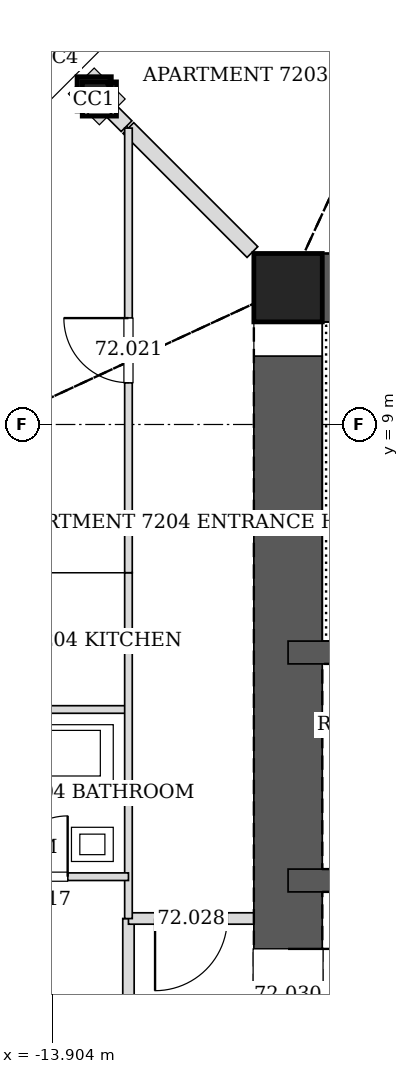
"""IFC4 building model, lengths in metres.
Left out: names, types, materials, properties, quantities, classifications, styles, units other than length and angle.
Written with IfcOpenShell. Run it as: python <this file> out.ifc"""

import sys

from ifc_helpers import new_model, si_unit, direction, frame, frame_2d, origin, origin_2d, place, context, subcontext, project, spatial, rectangle, hollow_rectangle, extrude, element, fill, save


model = new_model("IFC4")
c1 = context("Model", 3, precision=1e-05, world=origin(), true_north=direction((0.0, 1.0)))
c2 = subcontext(c1, "Body", "Model", "MODEL_VIEW")
j1 = project(units=[si_unit("LENGTHUNIT", "METRE"), si_unit("PLANEANGLEUNIT", "RADIAN")], contexts=[c1])
p1 = place(None, origin())
s1 = spatial("IfcSite", under=j1, at=p1, CompositionType="ELEMENT")
p2 = place(p1, origin())
s2 = spatial("IfcBuilding", under=s1, at=p2, CompositionType="ELEMENT")
p3 = place(p2, frame((0.0, 0.0, 294.6)))
s3 = spatial("IfcBuildingStorey", under=s2, at=p3, CompositionType="ELEMENT", Elevation=294.6)
p4 = place(p3, frame((-13.351, 13.351, 0.0), z_axis=(0.020026431307, -0.020026431307, 0.999598861593), x_axis=(0.707106781187, 0.707106781187, 0.0)))
e1 = element("IfcColumn", 1, at=p4, inside=s3, PredefinedType="COLUMN", context=c2, shape_type="SweptSolid", body=[
    extrude(hollow_rectangle(XDim=0.45, YDim=0.45, WallThickness=0.02, at=origin_2d()), origin(), (0.0, 0.0, 1.0), 3.401),
])
p5 = place(p3, frame((-10.8, 10.8, 0.0), z_axis=(0.0, 0.0, 1.0), x_axis=(1.0, 0.0, 0.0)))
e2 = element("IfcColumn", 2, at=p5, inside=s3, PredefinedType="COLUMN", context=c2, shape_type="SweptSolid", body=[
    extrude(hollow_rectangle(XDim=0.9, YDim=0.9, WallThickness=0.04, at=origin_2d()), origin(), (0.0, 0.0, 1.0), 3.4),
])
p6 = place(p3, frame((10.8, 10.8, 0.0), z_axis=(0.0, 0.0, 1.0), x_axis=(-1.0, 0.0, 0.0)))
e3 = element("IfcWall", 3, at=p6, inside=s3, PredefinedType="SOLIDWALL", context=c2, shape_type="SweptSolid", body=[
    extrude(rectangle(XDim=21.6, YDim=0.9, at=frame_2d((10.8, 0.0))), origin(), (0.0, 0.0, 1.0), 3.4),
])
p7 = place(p6, frame((10.05, 0.0, 0.0)))
e4 = element("IfcOpeningElement", 4, at=p7, cuts=e3, PredefinedType="OPENING", context=c2, shape_type="SweptSolid", body=[
    extrude(rectangle(XDim=1.5, YDim=2.1, at=frame_2d((0.75, 1.05))), frame((0.0, 0.46, 0.0), z_axis=(0.0, -1.0, 0.0), x_axis=(1.0, 0.0, 0.0)), (0.0, 0.0, 1.0), 0.92),
])
p8 = place(p3, frame((-10.8, 10.8, 0.0), z_axis=(0.0, 0.0, 1.0), x_axis=(0.0, -1.0, 0.0)))
e5 = element("IfcWall", 5, at=p8, inside=s3, PredefinedType="SOLIDWALL", context=c2, shape_type="SweptSolid", body=[
    extrude(rectangle(XDim=21.6, YDim=0.9, at=frame_2d((10.8, 0.0))), origin(), (0.0, 0.0, 1.0), 3.4),
])
p9 = place(p8, frame((8.7, 0.0, 0.0)))
e6 = element("IfcOpeningElement", 6, at=p9, cuts=e5, PredefinedType="OPENING", context=c2, shape_type="SweptSolid", body=[
    extrude(rectangle(XDim=1.2, YDim=2.1, at=frame_2d((0.6, 1.05))), frame((0.0, 0.46, 0.0), z_axis=(0.0, -1.0, 0.0), x_axis=(1.0, 0.0, 0.0)), (0.0, 0.0, 1.0), 0.92),
])
p10 = place(p8, frame((11.7, 0.0, 0.0)))
e7 = element("IfcOpeningElement", 7, at=p10, cuts=e5, PredefinedType="OPENING", context=c2, shape_type="SweptSolid", body=[
    extrude(rectangle(XDim=1.2, YDim=2.1, at=frame_2d((0.6, 1.05))), frame((0.0, 0.46, 0.0), z_axis=(0.0, -1.0, 0.0), x_axis=(1.0, 0.0, 0.0)), (0.0, 0.0, 1.0), 0.92),
])
p11 = place(p3, frame((-10.8, 3.0, 0.0), z_axis=(0.0, 0.0, 1.0), x_axis=(1.0, 0.0, 0.0)))
e8 = element("IfcWall", 8, at=p11, inside=s3, PredefinedType="SOLIDWALL", context=c2, shape_type="SweptSolid", body=[
    extrude(rectangle(XDim=21.6, YDim=0.3, at=frame_2d((10.8, 0.0))), origin(), (0.0, 0.0, 1.0), 3.4),
])
p12 = place(p11, frame((1.65, 0.0, 0.0)))
e9 = element("IfcOpeningElement", 9, at=p12, cuts=e8, PredefinedType="OPENING", context=c2, shape_type="SweptSolid", body=[
    extrude(rectangle(XDim=0.9, YDim=2.1, at=frame_2d((0.45, 1.05))), frame((0.0, 0.16, 0.0), z_axis=(0.0, -1.0, 0.0), x_axis=(1.0, 0.0, 0.0)), (0.0, 0.0, 1.0), 0.32),
])
p13 = place(p11, frame((4.55, 0.0, 0.0)))
e10 = element("IfcOpeningElement", 10, at=p13, cuts=e8, PredefinedType="OPENING", context=c2, shape_type="SweptSolid", body=[
    extrude(rectangle(XDim=0.9, YDim=2.1, at=frame_2d((0.45, 1.05))), frame((0.0, 0.16, 0.0), z_axis=(0.0, -1.0, 0.0), x_axis=(1.0, 0.0, 0.0)), (0.0, 0.0, 1.0), 0.32),
])
p14 = place(p11, frame((13.25, 0.0, 0.0)))
e11 = element("IfcOpeningElement", 11, at=p14, cuts=e8, PredefinedType="OPENING", context=c2, shape_type="SweptSolid", body=[
    extrude(rectangle(XDim=0.9, YDim=2.1, at=frame_2d((0.45, 1.05))), frame((0.0, 0.16, 0.0), z_axis=(0.0, -1.0, 0.0), x_axis=(1.0, 0.0, 0.0)), (0.0, 0.0, 1.0), 0.32),
])
p15 = place(p11, frame((7.45, 0.0, 0.0)))
e12 = element("IfcOpeningElement", 12, at=p15, cuts=e8, PredefinedType="OPENING", context=c2, shape_type="SweptSolid", body=[
    extrude(rectangle(XDim=0.9, YDim=2.1, at=frame_2d((0.45, 1.05))), frame((0.0, 0.16, 0.0), z_axis=(0.0, -1.0, 0.0), x_axis=(1.0, 0.0, 0.0)), (0.0, 0.0, 1.0), 0.32),
])
p16 = place(p11, frame((16.15, 0.0, 0.0)))
e13 = element("IfcOpeningElement", 13, at=p16, cuts=e8, PredefinedType="OPENING", context=c2, shape_type="SweptSolid", body=[
    extrude(rectangle(XDim=0.9, YDim=2.1, at=frame_2d((0.45, 1.05))), frame((0.0, 0.16, 0.0), z_axis=(0.0, -1.0, 0.0), x_axis=(1.0, 0.0, 0.0)), (0.0, 0.0, 1.0), 0.32),
])
p17 = place(p11, frame((19.05, 0.0, 0.0)))
e14 = element("IfcOpeningElement", 14, at=p17, cuts=e8, PredefinedType="OPENING", context=c2, shape_type="SweptSolid", body=[
    extrude(rectangle(XDim=0.9, YDim=2.1, at=frame_2d((0.45, 1.05))), frame((0.0, 0.16, 0.0), z_axis=(0.0, -1.0, 0.0), x_axis=(1.0, 0.0, 0.0)), (0.0, 0.0, 1.0), 0.32),
])
p18 = place(p3, frame((-10.8, 6.0, 0.0), z_axis=(0.0, 0.0, 1.0), x_axis=(1.0, 0.0, 0.0)))
e15 = element("IfcWall", 15, at=p18, inside=s3, PredefinedType="SOLIDWALL", context=c2, shape_type="SweptSolid", body=[
    extrude(rectangle(XDim=21.6, YDim=0.3, at=frame_2d((10.8, 0.0))), origin(), (0.0, 0.0, 1.0), 3.4),
])
p19 = place(p18, frame((10.25, 0.0, 0.0)))
e16 = element("IfcOpeningElement", 16, at=p19, cuts=e15, PredefinedType="OPENING", context=c2, shape_type="SweptSolid", body=[
    extrude(rectangle(XDim=1.1, YDim=2.1, at=frame_2d((0.55, 1.05))), frame((0.0, 0.16, 0.0), z_axis=(0.0, -1.0, 0.0), x_axis=(1.0, 0.0, 0.0)), (0.0, 0.0, 1.0), 0.32),
])
p20 = place(p3, frame((-12.9, 2.5, 0.0), z_axis=(0.0, 0.0, 1.0), x_axis=(0.0, -1.0, 0.0)))
e17 = element("IfcWall", 17, at=p20, inside=s3, PredefinedType="PARTITIONING", context=c2, shape_type="SweptSolid", body=[
    extrude(rectangle(XDim=9.251, YDim=0.15, at=frame_2d((4.625, 0.0))), origin(), (0.0, 0.0, 1.0), 2.349),
])
p21 = place(p3, frame((-11.25, 2.5, 0.0), z_axis=(0.0, 0.0, 1.0), x_axis=(-1.0, 0.0, 0.0)))
e18 = element("IfcWall", 18, at=p21, inside=s3, PredefinedType="PARTITIONING", context=c2, shape_type="SweptSolid", body=[
    extrude(rectangle(XDim=1.65, YDim=0.15, at=frame_2d((0.825, 0.0))), origin(), (0.0, 0.0, 1.0), 3.2),
])
p22 = place(p21, frame((0.35, 0.0, 0.0)))
e19 = element("IfcOpeningElement", 19, at=p22, cuts=e18, PredefinedType="OPENING", context=c2, shape_type="SweptSolid", body=[
    extrude(rectangle(XDim=0.95, YDim=2.1, at=frame_2d((0.475, 1.05))), frame((0.0, 0.085, 0.0), z_axis=(0.0, -1.0, 0.0), x_axis=(1.0, 0.0, 0.0)), (0.0, 0.0, 1.0), 0.17),
])
p23 = place(p3, frame((-13.11, 13.11, 0.0), z_axis=(0.0, 0.0, 1.0), x_axis=(0.707106781187, -0.707106781187, 0.0)))
e20 = element("IfcWall", 20, at=p23, inside=s3, PredefinedType="PARTITIONING", context=c2, shape_type="SweptSolid", body=[
    extrude(rectangle(XDim=0.262, YDim=0.2, at=frame_2d((0.131, 0.0))), origin(), (0.0, 0.0, 1.0), 2.591),
])
p24 = place(p3, frame((-12.901, 12.901, 0.0), z_axis=(0.0, 0.0, 1.0), x_axis=(0.707106781187, -0.707106781187, 0.0)))
e21 = element("IfcWall", 21, at=p24, inside=s3, PredefinedType="PARTITIONING", context=c2, shape_type="SweptSolid", body=[
    extrude(rectangle(XDim=2.308, YDim=0.2, at=frame_2d((1.154, 0.0))), origin(), (0.0, 0.0, 1.0), 2.591),
])
p25 = place(p3, frame((-15.3, 5.25, 0.0), z_axis=(0.0, 0.0, 1.0), x_axis=(1.0, 0.0, 0.0)))
e22 = element("IfcWall", 22, at=p25, inside=s3, PredefinedType="PARTITIONING", context=c2, shape_type="SweptSolid", body=[
    extrude(rectangle(XDim=2.4, YDim=0.1, at=frame_2d((1.2, 0.0))), origin(), (0.0, 0.0, 1.0), 2.73),
])
p26 = place(p3, frame((-12.9, 7.05, 0.0), z_axis=(0.0, 0.0, 1.0), x_axis=(0.0, -1.0, 0.0)))
e23 = element("IfcWall", 23, at=p26, inside=s3, PredefinedType="PARTITIONING", context=c2, shape_type="SweptSolid", body=[
    extrude(rectangle(XDim=4.551, YDim=0.1, at=frame_2d((2.275, 0.0))), origin(), (0.0, 0.0, 1.0), 3.2),
])
p27 = place(p3, frame((-15.3, 3.05, 0.0), z_axis=(0.0, 0.0, 1.0), x_axis=(1.0, 0.0, 0.0)))
e24 = element("IfcWall", 24, at=p27, inside=s3, PredefinedType="PARTITIONING", context=c2, shape_type="SweptSolid", body=[
    extrude(rectangle(XDim=2.4, YDim=0.1, at=frame_2d((1.2, 0.0))), origin(), (0.0, 0.0, 1.0), 2.73),
])
p28 = place(p27, frame((0.8, 0.0, 0.0)))
e25 = element("IfcOpeningElement", 25, at=p28, cuts=e24, PredefinedType="OPENING", context=c2, shape_type="SweptSolid", body=[
    extrude(rectangle(XDim=0.8, YDim=2.1, at=frame_2d((0.4, 1.05))), frame((0.0, 0.06, 0.0), z_axis=(0.0, -1.0, 0.0), x_axis=(1.0, 0.0, 0.0)), (0.0, 0.0, 1.0), 0.12),
])
p29 = place(p3, frame((-12.9, 7.05, 0.0), z_axis=(0.0, 0.0, 1.0), x_axis=(0.0, 1.0, 0.0)))
e26 = element("IfcWall", 26, at=p29, inside=s3, PredefinedType="PARTITIONING", context=c2, shape_type="SweptSolid", body=[
    extrude(rectangle(XDim=5.85, YDim=0.1, at=frame_2d((2.925, 0.0))), origin(), (0.0, 0.0, 1.0), 2.497),
])
p30 = place(p29, frame((2.5, 0.0, 0.0)))
e27 = element("IfcOpeningElement", 27, at=p30, cuts=e26, PredefinedType="OPENING", context=c2, shape_type="SweptSolid", body=[
    extrude(rectangle(XDim=0.85, YDim=2.1, at=frame_2d((0.425, 1.05))), frame((0.0, 0.06, 0.0), z_axis=(0.0, -1.0, 0.0), x_axis=(1.0, 0.0, 0.0)), (0.0, 0.0, 1.0), 0.12),
])
p31 = place(p28, origin())
e28 = element("IfcDoor", 28, at=p31, inside=s3, OperationType="SINGLE_SWING_RIGHT", PredefinedType="DOOR", context=c2, shape_type="SweptSolid", body=[
    extrude(rectangle(XDim=0.8, YDim=2.1, at=frame_2d((0.4, 1.05))), frame((0.0, 0.025, 0.0), z_axis=(0.0, -1.0, 0.0), x_axis=(1.0, 0.0, 0.0)), (0.0, 0.0, 1.0), 0.05),
])
fill(e25, e28)
p32 = place(p30, origin())
e29 = element("IfcDoor", 29, at=p32, inside=s3, OperationType="SINGLE_SWING_RIGHT", PredefinedType="DOOR", context=c2, shape_type="SweptSolid", body=[
    extrude(rectangle(XDim=0.85, YDim=2.1, at=frame_2d((0.425, 1.05))), frame((0.0, 0.025, 0.0), z_axis=(0.0, -1.0, 0.0), x_axis=(1.0, 0.0, 0.0)), (0.0, 0.0, 1.0), 0.05),
])
fill(e27, e29)
p33 = place(p22, origin())
e30 = element("IfcDoor", 30, at=p33, inside=s3, OperationType="SINGLE_SWING_RIGHT", PredefinedType="DOOR", context=c2, shape_type="SweptSolid", body=[
    extrude(rectangle(XDim=0.95, YDim=2.1, at=frame_2d((0.475, 1.05))), frame((0.0, 0.025, 0.0), z_axis=(0.0, -1.0, 0.0), x_axis=(1.0, 0.0, 0.0)), (0.0, 0.0, 1.0), 0.05),
])
fill(e19, e30)
p34 = place(p9, origin())
e31 = element("IfcDoor", 31, at=p34, inside=s3, OperationType="SINGLE_SWING_LEFT", PredefinedType="DOOR", context=c2, shape_type="SweptSolid", body=[
    extrude(rectangle(XDim=1.2, YDim=2.1, at=frame_2d((0.6, 1.05))), frame((0.0, 0.025, 0.0), z_axis=(0.0, -1.0, 0.0), x_axis=(1.0, 0.0, 0.0)), (0.0, 0.0, 1.0), 0.05),
])
fill(e6, e31)
save(model, sys.argv[1])
